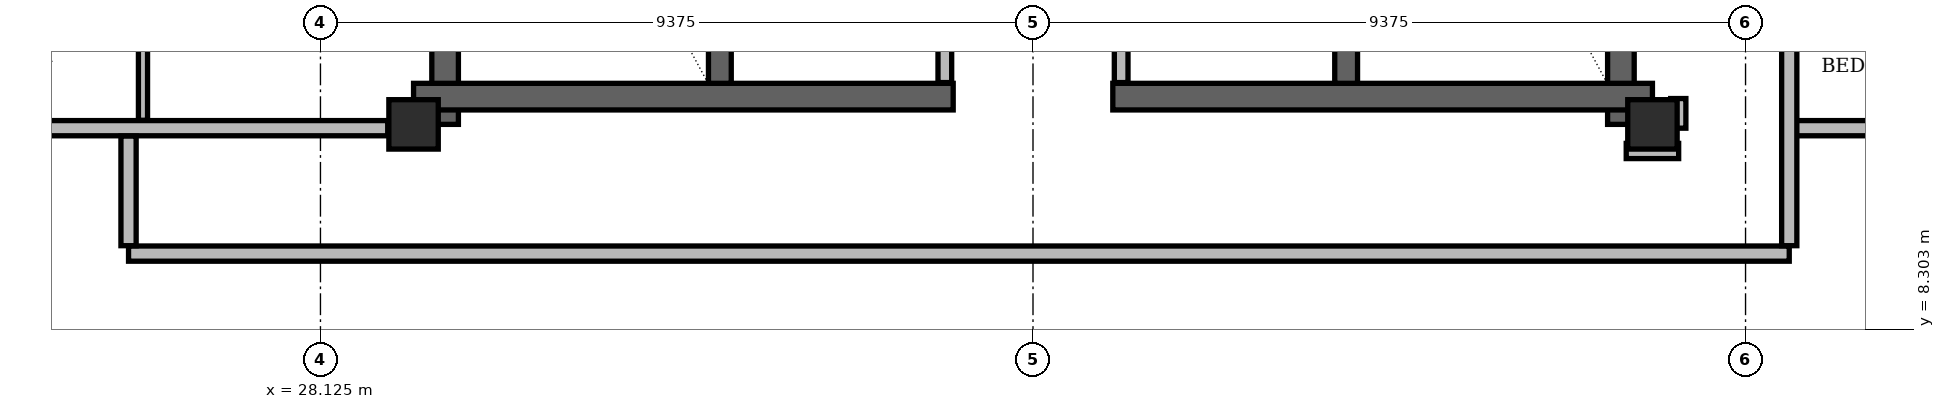
"""IFC4 building model, lengths in metres.
Left out: names, types, materials, properties, quantities, classifications, styles, units other than length and angle.
Written with IfcOpenShell. Run it as: python <this file> out.ifc"""

import sys

from ifc_helpers import new_model, si_unit, direction, frame, frame_2d, origin, origin_2d, place, context, subcontext, project, spatial, rectangle, hollow_rectangle, extrude, element, save


model = new_model("IFC4")
c1 = context("Model", 3, precision=1e-05, world=origin(), true_north=direction((0.0, 1.0)))
c2 = subcontext(c1, "Body", "Model", "MODEL_VIEW")
j1 = project(units=[si_unit("LENGTHUNIT", "METRE"), si_unit("PLANEANGLEUNIT", "RADIAN")], contexts=[c1])
p1 = place(None, origin())
s1 = spatial("IfcSite", under=j1, at=p1, CompositionType="ELEMENT")
p2 = place(p1, origin())
s2 = spatial("IfcBuilding", under=s1, at=p2, CompositionType="ELEMENT")
p3 = place(p2, frame((0.0, 0.0, 249.9)))
s3 = spatial("IfcBuildingStorey", under=s2, at=p3, CompositionType="ELEMENT", Elevation=249.9)
for number, where, z_axis, x_axis in (
    (1, (29.35, 11.0, 0.0), (0.0, 0.0, 1.0), (1.0, 0.0, 0.0)),
    (2, (45.65, 11.0, 0.0), (0.0, 0.0, 1.0), (1.0, 0.0, 0.0)),
):
    element("IfcColumn", number, at=place(p3, frame(where, z_axis=z_axis, x_axis=x_axis)), inside=s3, PredefinedType="COLUMN", context=c2, shape_type="SweptSolid", body=[
        extrude(hollow_rectangle(XDim=0.65, YDim=0.65, WallThickness=0.05, at=origin_2d()), origin(), (0.0, 0.0, 1.0), 3.9),
    ])
for number, where, z_axis, x_axis in (
    (3, (29.765, 11.0, 0.0), (0.0, 0.0, 1.0), (0.0, 1.0, 0.0)),
    (4, (45.235, 11.0, 0.0), (0.0, 0.0, 1.0), (0.0, 1.0, 0.0)),
):
    element("IfcWall", number, at=place(p3, frame(where, z_axis=z_axis, x_axis=x_axis)), inside=s3, PredefinedType="SHEAR", context=c2, shape_type="SweptSolid", body=[
        extrude(rectangle(XDim=13.3, YDim=0.35, at=frame_2d((6.65, 0.0))), origin(), (0.0, 0.0, 1.0), 3.68),
    ])
for number, where, z_axis, x_axis in (
    (5, (29.35, 11.365, 0.0), (0.0, 0.0, 1.0), (1.0, 0.0, 0.0)),
    (6, (38.55, 11.365, 0.0), (0.0, 0.0, 1.0), (1.0, 0.0, 0.0)),
):
    element("IfcWall", number, at=place(p3, frame(where, z_axis=z_axis, x_axis=x_axis)), inside=s3, PredefinedType="SHEAR", context=c2, shape_type="SweptSolid", body=[
        extrude(rectangle(XDim=7.1, YDim=0.35, at=frame_2d((3.55, 0.0))), origin(), (0.0, 0.0, 1.0), 3.68),
    ])
for number, where, z_axis, x_axis in (
    (7, (33.38, 11.54, 0.0), (0.0, 0.0, 1.0), (0.0, 1.0, 0.0)),
    (8, (41.62, 11.54, 0.0), (0.0, 0.0, 1.0), (0.0, 1.0, 0.0)),
):
    element("IfcWall", number, at=place(p3, frame(where, z_axis=z_axis, x_axis=x_axis)), inside=s3, PredefinedType="SHEAR", context=c2, shape_type="SweptSolid", body=[
        extrude(rectangle(XDim=7.62, YDim=0.3, at=frame_2d((3.81, 0.0))), origin(), (0.0, 0.0, 1.0), 3.68),
    ])
p4 = place(p3, frame((58.774, 10.99, 0.0), z_axis=(0.0, 0.0, 1.0), x_axis=(-0.499994896969, 0.866028350001, 0.0)))
e9 = element("IfcWall", 9, at=p4, inside=s3, PredefinedType="SOLIDWALL", context=c2, shape_type="SweptSolid", body=[
    extrude(rectangle(XDim=37.053, YDim=0.29, at=frame_2d((18.526, 0.0))), origin(), (0.0, 0.0, 1.0), 3.058),
])
p5 = place(p4, frame((6.789, 0.0, 0.0)))
e10 = element("IfcOpeningElement", 10, at=p5, cuts=e9, PredefinedType="OPENING", context=c2, shape_type="SweptSolid", body=[
    extrude(rectangle(XDim=1.5, YDim=2.2, at=frame_2d((0.75, 1.1))), frame((0.0, 0.145, 0.0), z_axis=(0.0, -1.0, 0.0), x_axis=(1.0, 0.0, 0.0)), (0.0, 0.0, 1.0), 0.29),
])
p6 = place(p4, frame((28.148, 0.0, 0.0)))
e11 = element("IfcOpeningElement", 11, at=p6, cuts=e9, PredefinedType="OPENING", context=c2, shape_type="SweptSolid", body=[
    extrude(rectangle(XDim=1.5, YDim=2.2, at=frame_2d((0.75, 1.1))), frame((0.0, 0.145, 0.0), z_axis=(0.0, -1.0, 0.0), x_axis=(1.0, 0.0, 0.0)), (0.0, 0.0, 1.0), 0.29),
])
p7 = place(p4, frame((12.184, 0.0, 0.85)))
e12 = element("IfcOpeningElement", 12, at=p7, cuts=e9, PredefinedType="OPENING", context=c2, shape_type="SweptSolid", body=[
    extrude(rectangle(XDim=2.6, YDim=1.95, at=frame_2d((1.3, 0.975))), frame((0.0, 0.145, 0.0), z_axis=(0.0, -1.0, 0.0), x_axis=(1.0, 0.0, 0.0)), (0.0, 0.0, 1.0), 0.29),
])
p8 = place(p4, frame((1.066, 0.0, 0.85)))
e13 = element("IfcOpeningElement", 13, at=p8, cuts=e9, PredefinedType="OPENING", context=c2, shape_type="SweptSolid", body=[
    extrude(rectangle(XDim=2.4, YDim=1.9, at=frame_2d((1.2, 0.95))), frame((0.0, 0.145, 0.0), z_axis=(0.0, -1.0, 0.0), x_axis=(1.0, 0.0, 0.0)), (0.0, 0.0, 1.0), 0.29),
])
p9 = place(p4, frame((33.328, 0.0, 0.85)))
e14 = element("IfcOpeningElement", 14, at=p9, cuts=e9, PredefinedType="OPENING", context=c2, shape_type="SweptSolid", body=[
    extrude(rectangle(XDim=1.2, YDim=1.48, at=frame_2d((0.6, 0.74))), frame((0.0, 0.145, 0.0), z_axis=(0.0, -1.0, 0.0), x_axis=(1.0, 0.0, 0.0)), (0.0, 0.0, 1.0), 0.29),
])
p10 = place(p4, frame((15.822, 0.0, 0.85)))
e15 = element("IfcOpeningElement", 15, at=p10, cuts=e9, PredefinedType="OPENING", context=c2, shape_type="SweptSolid", body=[
    extrude(rectangle(XDim=1.2, YDim=1.48, at=frame_2d((0.6, 0.74))), frame((0.0, 0.145, 0.0), z_axis=(0.0, -1.0, 0.0), x_axis=(1.0, 0.0, 0.0)), (0.0, 0.0, 1.0), 0.29),
])
p11 = place(p4, frame((23.327, 0.0, 0.85)))
e16 = element("IfcOpeningElement", 16, at=p11, cuts=e9, PredefinedType="OPENING", context=c2, shape_type="SweptSolid", body=[
    extrude(rectangle(XDim=1.2, YDim=1.48, at=frame_2d((0.6, 0.74))), frame((0.0, 0.145, 0.0), z_axis=(0.0, -1.0, 0.0), x_axis=(1.0, 0.0, 0.0)), (0.0, 0.0, 1.0), 0.29),
])
p12 = place(p3, frame((34.752, 43.079, 0.0), z_axis=(0.0, 0.0, 1.0), x_axis=(-0.499994896969, -0.866028350001, 0.0)))
e17 = element("IfcWall", 17, at=p12, inside=s3, PredefinedType="SOLIDWALL", context=c2, shape_type="SweptSolid", body=[
    extrude(rectangle(XDim=37.053, YDim=0.29, at=frame_2d((18.526, 0.0))), origin(), (0.0, 0.0, 1.0), 3.058),
])
p13 = place(p12, frame((3.639, 0.0, 0.0)))
e18 = element("IfcOpeningElement", 18, at=p13, cuts=e17, PredefinedType="OPENING", context=c2, shape_type="SweptSolid", body=[
    extrude(rectangle(XDim=1.5, YDim=2.2, at=frame_2d((0.75, 1.1))), frame((0.0, 0.145, 0.0), z_axis=(0.0, -1.0, 0.0), x_axis=(1.0, 0.0, 0.0)), (0.0, 0.0, 1.0), 0.29),
])
p14 = place(p12, frame((27.518, 0.0, 0.0)))
e19 = element("IfcOpeningElement", 19, at=p14, cuts=e17, PredefinedType="OPENING", context=c2, shape_type="SweptSolid", body=[
    extrude(rectangle(XDim=1.5, YDim=2.2, at=frame_2d((0.75, 1.1))), frame((0.0, 0.145, 0.0), z_axis=(0.0, -1.0, 0.0), x_axis=(1.0, 0.0, 0.0)), (0.0, 0.0, 1.0), 0.29),
])
p15 = place(p12, frame((22.803, 0.0, 0.85)))
e20 = element("IfcOpeningElement", 20, at=p15, cuts=e17, PredefinedType="OPENING", context=c2, shape_type="SweptSolid", body=[
    extrude(rectangle(XDim=1.6, YDim=1.7, at=frame_2d((0.8, 0.85))), frame((0.0, 0.145, 0.0), z_axis=(0.0, -1.0, 0.0), x_axis=(1.0, 0.0, 0.0)), (0.0, 0.0, 1.0), 0.29),
])
p16 = place(p12, frame((34.371, 0.0, 0.85)))
e21 = element("IfcOpeningElement", 21, at=p16, cuts=e17, PredefinedType="OPENING", context=c2, shape_type="SweptSolid", body=[
    extrude(rectangle(XDim=1.4, YDim=1.6, at=frame_2d((0.7, 0.8))), frame((0.0, 0.145, 0.0), z_axis=(0.0, -1.0, 0.0), x_axis=(1.0, 0.0, 0.0)), (0.0, 0.0, 1.0), 0.29),
])
p17 = place(p12, frame((8.135, 0.0, 0.85)))
e22 = element("IfcOpeningElement", 22, at=p17, cuts=e17, PredefinedType="OPENING", context=c2, shape_type="SweptSolid", body=[
    extrude(rectangle(XDim=1.8, YDim=1.75, at=frame_2d((0.9, 0.875))), frame((0.0, 0.145, 0.0), z_axis=(0.0, -1.0, 0.0), x_axis=(1.0, 0.0, 0.0)), (0.0, 0.0, 1.0), 0.29),
])
p18 = place(p12, frame((17.81, 0.0, 0.85)))
e23 = element("IfcOpeningElement", 23, at=p18, cuts=e17, PredefinedType="OPENING", context=c2, shape_type="SweptSolid", body=[
    extrude(rectangle(XDim=1.2, YDim=1.48, at=frame_2d((0.6, 0.74))), frame((0.0, 0.145, 0.0), z_axis=(0.0, -1.0, 0.0), x_axis=(1.0, 0.0, 0.0)), (0.0, 0.0, 1.0), 0.29),
])
p19 = place(p12, frame((1.294, 0.0, 0.85)))
e24 = element("IfcOpeningElement", 24, at=p19, cuts=e17, PredefinedType="OPENING", context=c2, shape_type="SweptSolid", body=[
    extrude(rectangle(XDim=1.6, YDim=1.7, at=frame_2d((0.8, 0.85))), frame((0.0, 0.145, 0.0), z_axis=(0.0, -1.0, 0.0), x_axis=(1.0, 0.0, 0.0)), (0.0, 0.0, 1.0), 0.29),
])
p20 = place(p3, frame((36.34, 11.55, 0.0), z_axis=(0.0, 0.0, 1.0), x_axis=(0.0, 1.0, 0.0)))
e25 = element("IfcWall", 25, at=p20, inside=s3, PredefinedType="PARTITIONING", context=c2, shape_type="SweptSolid", body=[
    extrude(rectangle(XDim=5.55, YDim=0.18, at=frame_2d((2.775, 0.0))), origin(), (0.0, 0.0, 1.0), 3.68),
])
p21 = place(p20, frame((2.85, 0.0, 0.0)))
e26 = element("IfcOpeningElement", 26, at=p21, cuts=e25, PredefinedType="OPENING", context=c2, shape_type="SweptSolid", body=[
    extrude(rectangle(XDim=0.95, YDim=2.1, at=frame_2d((0.475, 1.05))), frame((0.0, 0.09, 0.0), z_axis=(0.0, -1.0, 0.0), x_axis=(1.0, 0.0, 0.0)), (0.0, 0.0, 1.0), 0.18),
])
p22 = place(p3, frame((38.66, 11.55, 0.0), z_axis=(0.0, 0.0, 1.0), x_axis=(0.0, 1.0, 0.0)))
e27 = element("IfcWall", 27, at=p22, inside=s3, PredefinedType="PARTITIONING", context=c2, shape_type="SweptSolid", body=[
    extrude(rectangle(XDim=5.55, YDim=0.18, at=frame_2d((2.775, 0.0))), origin(), (0.0, 0.0, 1.0), 3.68),
])
p23 = place(p22, frame((3.15, 0.0, 0.0)))
e28 = element("IfcOpeningElement", 28, at=p23, cuts=e27, PredefinedType="OPENING", context=c2, shape_type="SweptSolid", body=[
    extrude(rectangle(XDim=0.95, YDim=2.1, at=frame_2d((0.475, 1.05))), frame((0.0, 0.09, 0.0), z_axis=(0.0, -1.0, 0.0), x_axis=(1.0, 0.0, 0.0)), (0.0, 0.0, 1.0), 0.18),
])
p24 = place(p3, frame((25.6, 9.3, 0.0), z_axis=(0.0, 0.0, 1.0), x_axis=(1.0, 0.0, 0.0)))
e29 = element("IfcWall", 29, at=p24, inside=s3, PredefinedType="PARTITIONING", context=c2, shape_type="SweptSolid", body=[
    extrude(rectangle(XDim=21.85, YDim=0.2, at=frame_2d((10.925, 0.0))), origin(), (0.0, 0.0, 1.0), 3.266),
])
p25 = place(p3, frame((45.305, 10.65, 0.0), z_axis=(0.0, 0.0, 1.0), x_axis=(1.0, 0.0, 0.0)))
e30 = element("IfcWall", 30, at=p25, inside=s3, PredefinedType="PARTITIONING", context=c2, shape_type="SweptSolid", body=[
    extrude(rectangle(XDim=0.69, YDim=0.2, at=frame_2d((0.345, 0.0))), origin(), (0.0, 0.0, 1.0), 3.68),
])
p26 = place(p3, frame((16.561, 10.95, 0.0), z_axis=(0.0, 0.0, 1.0), x_axis=(1.0, 0.0, 0.0)))
e31 = element("IfcWall", 31, at=p26, inside=s3, PredefinedType="PARTITIONING", context=c2, shape_type="SweptSolid", body=[
    extrude(rectangle(XDim=12.449, YDim=0.2, at=frame_2d((6.225, 0.0))), origin(), (0.0, 0.0, 1.0), 3.266),
])
p27 = place(p3, frame((47.45, 10.95, 0.0), z_axis=(0.0, 0.0, 1.0), x_axis=(1.0, 0.0, 0.0)))
e32 = element("IfcWall", 32, at=p27, inside=s3, PredefinedType="PARTITIONING", context=c2, shape_type="SweptSolid", body=[
    extrude(rectangle(XDim=10.989, YDim=0.2, at=frame_2d((5.495, 0.0))), origin(), (0.0, 0.0, 1.0), 3.266),
])
p28 = place(p3, frame((25.6, 9.404, 0.0), z_axis=(0.0, 0.0, 1.0), x_axis=(0.0, 1.0, 0.0)))
e33 = element("IfcWall", 33, at=p28, inside=s3, PredefinedType="PARTITIONING", context=c2, shape_type="SweptSolid", body=[
    extrude(rectangle(XDim=1.442, YDim=0.2, at=frame_2d((0.721, 0.0))), origin(), (0.0, 0.0, 1.0), 3.68),
])
p29 = place(p3, frame((25.79, 11.054, 0.0), z_axis=(0.0, 0.0, 1.0), x_axis=(0.0, 1.0, 0.0)))
e34 = element("IfcWall", 34, at=p29, inside=s3, PredefinedType="PARTITIONING", context=c2, shape_type="SweptSolid", body=[
    extrude(rectangle(XDim=2.922, YDim=0.12, at=frame_2d((1.461, 0.0))), origin(), (0.0, 0.0, 1.0), 3.68),
])
p30 = place(p3, frame((45.99, 10.95, 0.0), z_axis=(0.0, 0.0, 1.0), x_axis=(0.0, 1.0, 0.0)))
e35 = element("IfcWall", 35, at=p30, inside=s3, PredefinedType="PARTITIONING", context=c2, shape_type="SweptSolid", body=[
    extrude(rectangle(XDim=0.39, YDim=0.2, at=frame_2d((0.195, 0.0))), origin(), (0.0, 0.0, 1.0), 3.266),
])
p31 = place(p3, frame((47.45, 9.404, 0.0), z_axis=(0.0, 0.0, 1.0), x_axis=(0.0, 1.0, 0.0)))
e36 = element("IfcWall", 36, at=p31, inside=s3, PredefinedType="PARTITIONING", context=c2, shape_type="SweptSolid", body=[
    extrude(rectangle(XDim=16.462, YDim=0.2, at=frame_2d((8.231, 0.0))), origin(), (0.0, 0.0, 1.0), 3.266),
])
p32 = place(p31, frame((9.32, 0.0, 0.0)))
e37 = element("IfcOpeningElement", 37, at=p32, cuts=e36, PredefinedType="OPENING", context=c2, shape_type="SweptSolid", body=[
    extrude(rectangle(XDim=1.0, YDim=2.18, at=frame_2d((0.5, 1.09))), frame((0.0, 0.1, 0.0), z_axis=(0.0, -1.0, 0.0), x_axis=(1.0, 0.0, 0.0)), (0.0, 0.0, 1.0), 0.2),
])
save(model, sys.argv[1])
